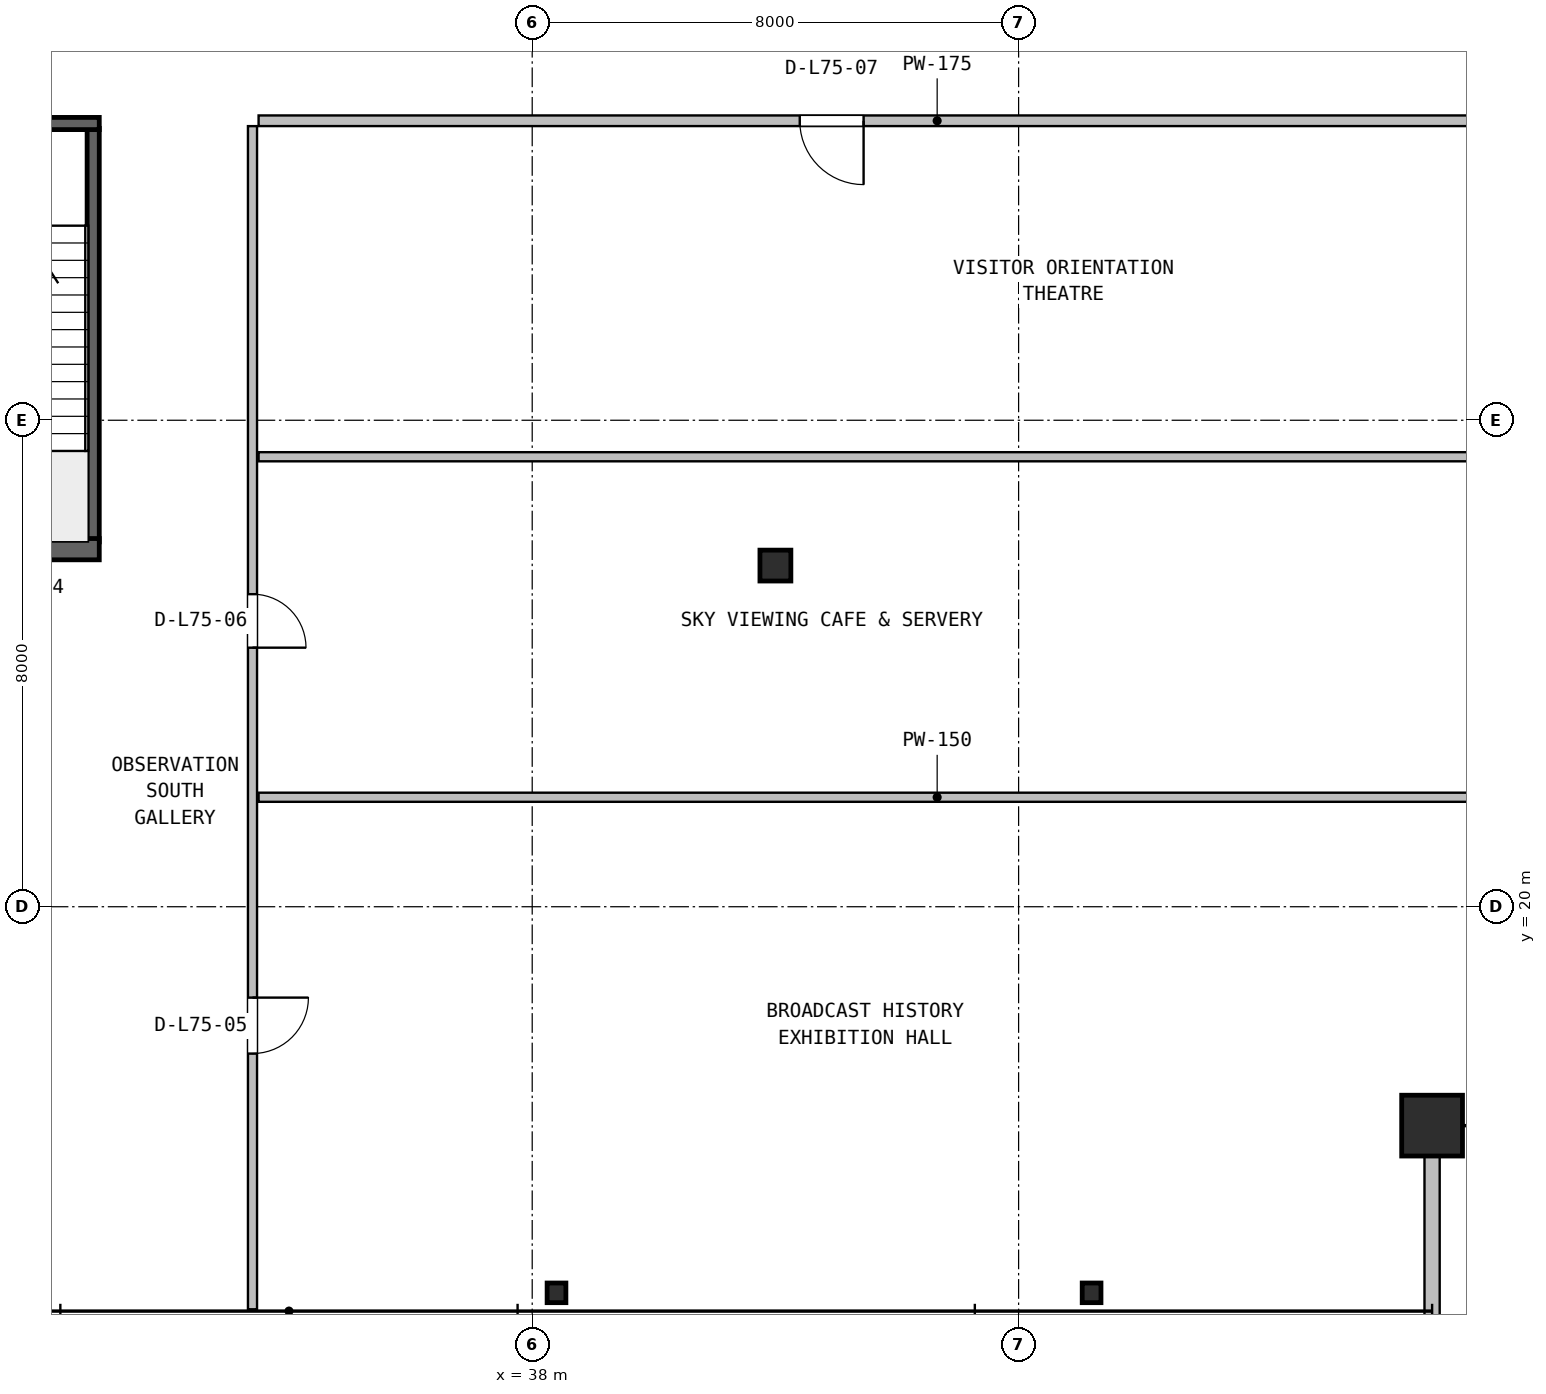
"""IFC4 building model, lengths in metres.
Left out: names, types, materials, properties, quantities, classifications, styles, units other than length and angle.
Written with IfcOpenShell. Run it as: python <this file> out.ifc"""

import sys

from ifc_helpers import new_model, si_unit, direction, frame, frame_2d, origin, origin_2d, place, context, subcontext, project, spatial, rectangle, hollow_rectangle, hollow_circle, i_section, extrude, source, transform, mapped, element, fill, save


model = new_model("IFC4")
c1 = context("Model", 3, precision=1e-05, world=origin(), true_north=direction((0.0, 1.0)))
c2 = subcontext(c1, "Body", "Model", "MODEL_VIEW")
j1 = project(units=[si_unit("LENGTHUNIT", "METRE"), si_unit("PLANEANGLEUNIT", "RADIAN")], contexts=[c1])
p1 = place(None, origin())
s1 = spatial("IfcSite", under=j1, at=p1, CompositionType="ELEMENT")
p2 = place(p1, origin())
s2 = spatial("IfcBuilding", under=s1, at=p2, CompositionType="ELEMENT")
p3 = place(p2, frame((0.0, 0.0, 300.2)))
s3 = spatial("IfcBuildingStorey", under=s2, at=p3, CompositionType="ELEMENT", Elevation=300.2)
m1 = source(origin(), c2, "Body", "SweptSolid", [
    extrude(hollow_rectangle(XDim=1.0, YDim=1.0, WallThickness=0.04, at=origin_2d()), origin(), (0.0, 0.0, 1.0), 4.8),
])
p4 = place(p3, frame((52.8, 16.4, 0.0), z_axis=(0.0, 0.0, 1.0), x_axis=(1.0, 0.0, 0.0)))
e1 = element("IfcColumn", 1, at=p4, inside=s3, PredefinedType="COLUMN", context=c2, shape_type="MappedRepresentation", body=[
    mapped(m1, transform((0.0, 0.0, 0.0), x_axis=(1.0, 0.0, 0.0), y_axis=(0.0, 1.0, 0.0), z_axis=(0.0, 0.0, 1.0), scale=1.0)),
])
m2 = source(origin(), c2, "Body", "SweptSolid", [
    extrude(i_section(OverallWidth=0.309, OverallDepth=0.323, WebThickness=0.014, FlangeThickness=0.023, FilletRadius=0.015, at=origin_2d()), origin(), (0.0, 0.0, 1.0), 4.8),
])
for number, where, z_axis, x_axis in (
    (2, (38.4, 13.65, 0.0), (0.0, 0.0, 1.0), (1.0, 0.0, 0.0)),
    (3, (47.2, 13.65, 0.0), (0.0, 0.0, 1.0), (1.0, 0.0, 0.0)),
):
    element("IfcColumn", number, at=place(p3, frame(where, z_axis=z_axis, x_axis=x_axis)), inside=s3, PredefinedType="COLUMN", context=c2, shape_type="MappedRepresentation", body=[
        mapped(m2, transform((0.0, 0.0, 0.0), x_axis=(1.0, 0.0, 0.0), y_axis=(0.0, 1.0, 0.0), z_axis=(0.0, 0.0, 1.0), scale=1.0)),
    ])
m3 = source(origin(), c2, "Body", "SweptSolid", [
    extrude(hollow_circle(Radius=0.254, WallThickness=0.02, at=origin_2d()), origin(), (0.0, 0.0, 1.0), 4.8),
])
p5 = place(p3, frame((42.0, 25.61, 0.0), z_axis=(0.0, 0.0, 1.0), x_axis=(1.0, 0.0, 0.0)))
e4 = element("IfcColumn", 4, at=p5, inside=s3, PredefinedType="COLUMN", context=c2, shape_type="MappedRepresentation", body=[
    mapped(m3, transform((0.0, 0.0, 0.0), x_axis=(1.0, 0.0, 0.0), y_axis=(0.0, 1.0, 0.0), z_axis=(0.0, 0.0, 1.0), scale=1.0)),
])
p6 = place(p3, frame((52.8, 13.28, 0.0), z_axis=(0.0, 0.0, 1.0), x_axis=(0.0, 1.0, 0.0)))
e5 = element("IfcWall", 5, at=p6, inside=s3, PredefinedType="SOLIDWALL", context=c2, shape_type="SweptSolid", body=[
    extrude(rectangle(XDim=3.2, YDim=0.25, at=frame_2d((1.6, 0.0))), origin(), (0.0, 0.0, 1.0), 4.141),
])
p7 = place(p3, frame((30.78, 26.0, -0.28), z_axis=(0.0, 0.0, 1.0), x_axis=(0.0, 1.0, 0.0)))
e6 = element("IfcWall", 6, at=p7, inside=s3, PredefinedType="SHEAR", context=c2, shape_type="SweptSolid", body=[
    extrude(rectangle(XDim=6.8, YDim=0.2, at=frame_2d((3.4, 0.0))), origin(), (0.0, 0.0, 1.0), 4.8),
])
p8 = place(p3, frame((27.62, 25.88, -0.28), z_axis=(0.0, 0.0, 1.0), x_axis=(1.0, 0.0, 0.0)))
e7 = element("IfcWall", 7, at=p8, inside=s3, PredefinedType="SHEAR", context=c2, shape_type="SweptSolid", body=[
    extrude(rectangle(XDim=3.26, YDim=0.35, at=frame_2d((1.63, 0.0))), origin(), (0.0, 0.0, 1.0), 4.8),
])
p9 = place(p3, frame((27.62, 32.88, -0.28), z_axis=(0.0, 0.0, 1.0), x_axis=(1.0, 0.0, 0.0)))
e8 = element("IfcWall", 8, at=p9, inside=s3, PredefinedType="SHEAR", context=c2, shape_type="SweptSolid", body=[
    extrude(rectangle(XDim=3.26, YDim=0.2, at=frame_2d((1.63, 0.0))), origin(), (0.0, 0.0, 1.0), 4.8),
])
p10 = place(p9, frame((1.15, 0.0, 0.28)))
e9 = element("IfcOpeningElement", 9, at=p10, cuts=e8, PredefinedType="OPENING", context=c2, shape_type="SweptSolid", body=[
    extrude(rectangle(XDim=0.95, YDim=2.1, at=frame_2d((0.475, 1.05))), frame((0.0, 0.11, 0.0), z_axis=(0.0, -1.0, 0.0), x_axis=(1.0, 0.0, 0.0)), (0.0, 0.0, 1.0), 0.22),
])
p11 = place(p3, frame((33.5, 21.8, 0.0), z_axis=(0.0, 0.0, 1.0), x_axis=(1.0, 0.0, 0.0)))
e10 = element("IfcWall", 10, at=p11, inside=s3, PredefinedType="PARTITIONING", context=c2, shape_type="SweptSolid", body=[
    extrude(rectangle(XDim=22.32, YDim=0.15, at=frame_2d((11.16, 0.0))), origin(), (0.0, 0.0, 1.0), 3.951),
])
p12 = place(p3, frame((33.4, 13.38, 0.0), z_axis=(0.0, 0.0, 1.0), x_axis=(0.0, 1.0, 0.0)))
e11 = element("IfcWall", 11, at=p12, inside=s3, PredefinedType="PARTITIONING", context=c2, shape_type="SweptSolid", body=[
    extrude(rectangle(XDim=19.457, YDim=0.15, at=frame_2d((9.729, 0.0))), origin(), (0.0, 0.0, 1.0), 3.951),
])
p13 = place(p12, frame((4.205, 0.0, 0.0)))
e12 = element("IfcOpeningElement", 12, at=p13, cuts=e11, PredefinedType="OPENING", context=c2, shape_type="SweptSolid", body=[
    extrude(rectangle(XDim=0.92, YDim=2.08, at=frame_2d((0.46, 1.04))), frame((0.0, 0.085, 0.0), z_axis=(0.0, -1.0, 0.0), x_axis=(1.0, 0.0, 0.0)), (0.0, 0.0, 1.0), 0.17),
])
p14 = place(p12, frame((10.88, 0.0, 0.0)))
e13 = element("IfcOpeningElement", 13, at=p14, cuts=e11, PredefinedType="OPENING", context=c2, shape_type="SweptSolid", body=[
    extrude(rectangle(XDim=0.88, YDim=2.06, at=frame_2d((0.44, 1.03))), frame((0.0, 0.085, 0.0), z_axis=(0.0, -1.0, 0.0), x_axis=(1.0, 0.0, 0.0)), (0.0, 0.0, 1.0), 0.17),
])
p15 = place(p3, frame((33.5, 27.4, 0.0), z_axis=(0.0, 0.0, 1.0), x_axis=(1.0, 0.0, 0.0)))
e14 = element("IfcWall", 14, at=p15, inside=s3, PredefinedType="PARTITIONING", context=c2, shape_type="SweptSolid", body=[
    extrude(rectangle(XDim=22.32, YDim=0.15, at=frame_2d((11.16, 0.0))), origin(), (0.0, 0.0, 1.0), 3.951),
])
p16 = place(p3, frame((33.5, 32.925, 0.0), z_axis=(0.0, 0.0, 1.0), x_axis=(1.0, 0.0, 0.0)))
e15 = element("IfcWall", 15, at=p16, inside=s3, PredefinedType="PARTITIONING", context=c2, shape_type="SweptSolid", body=[
    extrude(rectangle(XDim=22.32, YDim=0.175, at=frame_2d((11.16, 0.0))), origin(), (0.0, 0.0, 1.0), 3.951),
])
p17 = place(p16, frame((8.9, 0.0, 0.0)))
e16 = element("IfcOpeningElement", 16, at=p17, cuts=e15, PredefinedType="OPENING", context=c2, shape_type="SweptSolid", body=[
    extrude(rectangle(XDim=1.05, YDim=2.1, at=frame_2d((0.525, 1.05))), frame((0.0, 0.098, 0.0), z_axis=(0.0, -1.0, 0.0), x_axis=(1.0, 0.0, 0.0)), (0.0, 0.0, 1.0), 0.195),
])
m4 = source(origin(), c2, "Body", "SweptSolid", [
    extrude(rectangle(XDim=0.92, YDim=2.08, at=frame_2d((0.46, 1.04))), frame((0.0, 0.025, 0.0), z_axis=(0.0, -1.0, 0.0), x_axis=(1.0, 0.0, 0.0)), (0.0, 0.0, 1.0), 0.05),
])
p18 = place(p13, frame((0.92, 0.0, 0.0), z_axis=(0.0, 0.0, 1.0), x_axis=(-1.0, 0.0, 0.0)))
e17 = element("IfcDoor", 17, at=p18, inside=s3, OperationType="SINGLE_SWING_RIGHT", PredefinedType="DOOR", context=c2, shape_type="MappedRepresentation", body=[
    mapped(m4, transform((0.0, 0.0, 0.0), x_axis=(1.0, 0.0, 0.0), y_axis=(0.0, 1.0, 0.0), z_axis=(0.0, 0.0, 1.0), scale=1.0)),
])
fill(e12, e17)
m5 = source(origin(), c2, "Body", "SweptSolid", [
    extrude(rectangle(XDim=0.88, YDim=2.06, at=frame_2d((0.44, 1.03))), frame((0.0, 0.025, 0.0), z_axis=(0.0, -1.0, 0.0), x_axis=(1.0, 0.0, 0.0)), (0.0, 0.0, 1.0), 0.05),
])
p19 = place(p14, frame((0.88, 0.0, 0.0), z_axis=(0.0, 0.0, 1.0), x_axis=(-1.0, 0.0, 0.0)))
e18 = element("IfcDoor", 18, at=p19, inside=s3, OperationType="SINGLE_SWING_LEFT", PredefinedType="DOOR", context=c2, shape_type="MappedRepresentation", body=[
    mapped(m5, transform((0.0, 0.0, 0.0), x_axis=(1.0, 0.0, 0.0), y_axis=(0.0, 1.0, 0.0), z_axis=(0.0, 0.0, 1.0), scale=1.0)),
])
fill(e13, e18)
m6 = source(origin(), c2, "Body", "SweptSolid", [
    extrude(rectangle(XDim=1.05, YDim=2.1, at=frame_2d((0.525, 1.05))), frame((0.0, 0.025, 0.0), z_axis=(0.0, -1.0, 0.0), x_axis=(1.0, 0.0, 0.0)), (0.0, 0.0, 1.0), 0.05),
])
p20 = place(p17, frame((1.05, 0.0, 0.0), z_axis=(0.0, 0.0, 1.0), x_axis=(-1.0, 0.0, 0.0)))
e19 = element("IfcDoor", 19, at=p20, inside=s3, OperationType="SINGLE_SWING_RIGHT", PredefinedType="DOOR", context=c2, shape_type="MappedRepresentation", body=[
    mapped(m6, transform((0.0, 0.0, 0.0), x_axis=(1.0, 0.0, 0.0), y_axis=(0.0, 1.0, 0.0), z_axis=(0.0, 0.0, 1.0), scale=1.0)),
])
fill(e16, e19)
save(model, sys.argv[1])
